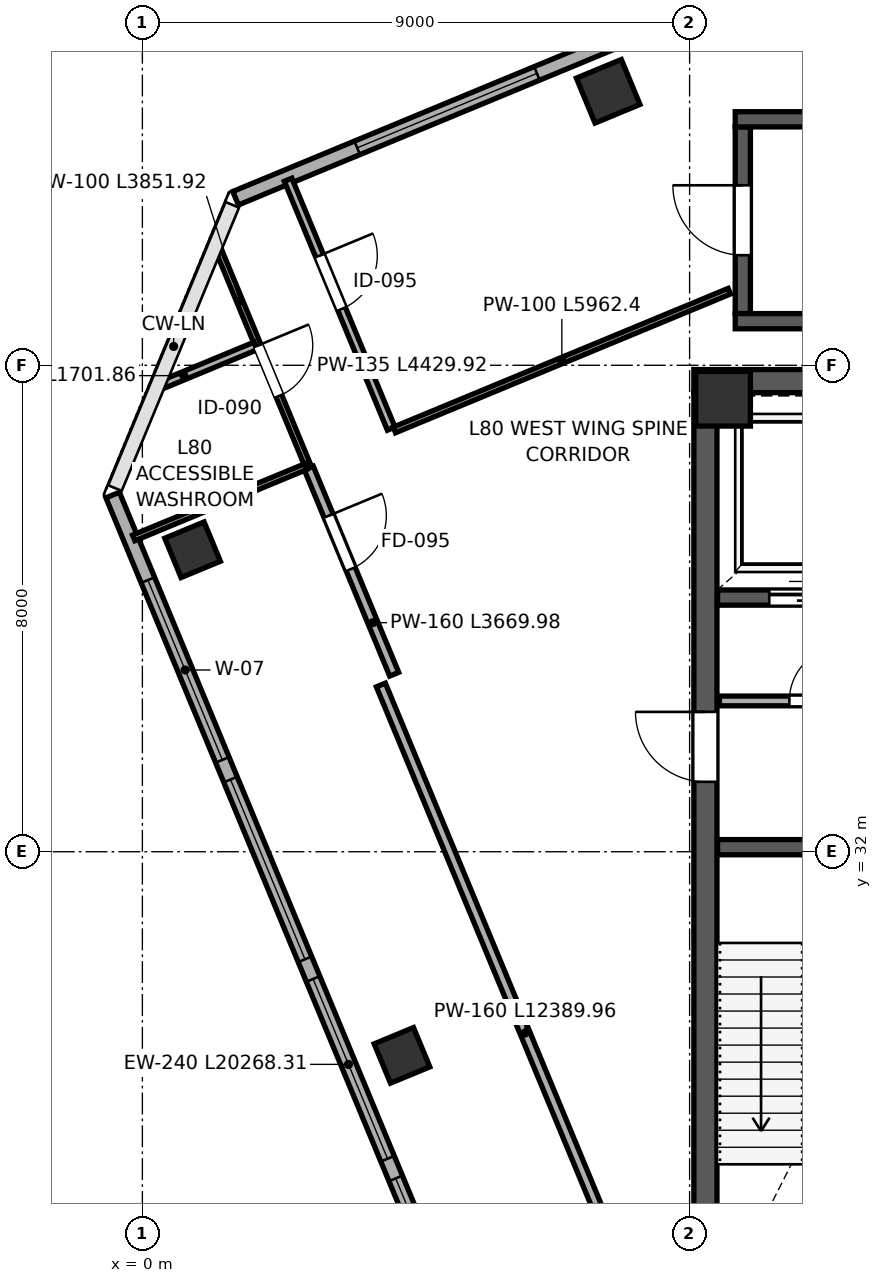
"""IFC4 building model, lengths in metres.
Left out: names, types, materials, properties, quantities, classifications, styles, units other than length and angle.
Written with IfcOpenShell. Run it as: python <this file> out.ifc"""

import sys

from ifc_helpers import new_model, si_unit, direction, frame, frame_2d, origin, origin_2d, place, context, subcontext, project, spatial, rectangle, extrude, source, transform, mapped, element, fill, save


model = new_model("IFC4")
c1 = context("Model", 3, precision=1e-05, world=origin(), true_north=direction((0.0, 1.0)))
c2 = subcontext(c1, "Body", "Model", "MODEL_VIEW")
j1 = project(units=[si_unit("LENGTHUNIT", "METRE"), si_unit("PLANEANGLEUNIT", "RADIAN")], contexts=[c1])
p1 = place(None, origin())
s1 = spatial("IfcSite", under=j1, at=p1, CompositionType="ELEMENT")
p2 = place(p1, origin())
s2 = spatial("IfcBuilding", under=s1, at=p2, CompositionType="ELEMENT")
p3 = place(p2, frame((0.0, 0.0, 355.2)))
s3 = spatial("IfcBuildingStorey", under=s2, at=p3, CompositionType="ELEMENT", Elevation=355.2)
m1 = source(origin(), c2, "Body", "SweptSolid", [
    extrude(rectangle(XDim=0.9, YDim=0.9, at=origin_2d()), origin(), (0.0, 0.0, 1.0), 4.799),
])
p4 = place(p3, frame((9.55, 39.45, 0.001), z_axis=(0.0, 0.0, 1.0), x_axis=(1.0, 0.0, 0.0)))
e1 = element("IfcColumn", 1, at=p4, inside=s3, PredefinedType="COLUMN", context=c2, shape_type="MappedRepresentation", body=[
    mapped(m1, transform((0.0, 0.0, 0.0), scale=1.0)),
])
m2 = source(origin(), c2, "Body", "SweptSolid", [
    extrude(rectangle(XDim=0.7, YDim=0.7, at=origin_2d()), origin(), (0.0, 0.0, 1.0), 4.799),
])
for number, where, z_axis, x_axis in (
    (2, (0.826, 36.966, 0.001), (0.0, 0.0, 1.0), (-0.383, 0.924, 0.0)),
    (3, (4.27, 28.651, 0.001), (0.0, 0.0, 1.0), (-0.383, 0.924, 0.0)),
):
    element("IfcColumn", number, at=place(p3, frame(where, z_axis=z_axis, x_axis=x_axis)), inside=s3, PredefinedType="COLUMN", context=c2, shape_type="MappedRepresentation", body=[
        mapped(m2, transform((0.0, 0.0, 0.0), scale=1.0)),
    ])
m3 = source(origin(), c2, "Body", "SweptSolid", [
    extrude(rectangle(XDim=0.8, YDim=0.8, at=origin_2d()), origin(), (0.0, 0.0, 1.0), 4.799),
])
p5 = place(p3, frame((7.661, 44.506, 0.001), z_axis=(0.0, 0.0, 1.0), x_axis=(-0.382683432365, 0.923879532511, 0.0)))
e4 = element("IfcColumn", 4, at=p5, inside=s3, PredefinedType="COLUMN", context=c2, shape_type="MappedRepresentation", body=[
    mapped(m3, transform((0.0, 0.0, 0.0), scale=1.0)),
])
p6 = place(p3, frame((-0.489, 37.866, 0.0), z_axis=(0.0, 0.0, 1.0), x_axis=(0.382671297852, -0.923884558698, 0.0)))
e5 = element("IfcWall", 5, at=p6, inside=s3, PredefinedType="SOLIDWALL", context=c2, shape_type="SweptSolid", body=[
    extrude(rectangle(XDim=20.268, YDim=0.24, at=frame_2d((10.134, 0.0))), origin(), (0.0, 0.0, 1.0), 4.52),
])
p7 = place(p6, frame((1.514, 0.0, 0.45)))
e6 = element("IfcOpeningElement", 6, at=p7, cuts=e5, PredefinedType="OPENING", context=c2, shape_type="SweptSolid", body=[
    extrude(rectangle(XDim=3.2, YDim=2.5, at=frame_2d((1.6, 1.25))), frame((0.0, 0.13, 0.0), z_axis=(0.0, -1.0, 0.0), x_axis=(1.0, 0.0, 0.0)), (0.0, 0.0, 1.0), 0.26),
])
p8 = place(p6, frame((5.064, 0.0, 0.45)))
e7 = element("IfcOpeningElement", 7, at=p8, cuts=e5, PredefinedType="OPENING", context=c2, shape_type="SweptSolid", body=[
    extrude(rectangle(XDim=3.2, YDim=2.5, at=frame_2d((1.6, 1.25))), frame((0.0, 0.13, 0.0), z_axis=(0.0, -1.0, 0.0), x_axis=(1.0, 0.0, 0.0)), (0.0, 0.0, 1.0), 0.26),
])
p9 = place(p6, frame((8.614, 0.0, 0.45)))
e8 = element("IfcOpeningElement", 8, at=p9, cuts=e5, PredefinedType="OPENING", context=c2, shape_type="SweptSolid", body=[
    extrude(rectangle(XDim=3.2, YDim=2.5, at=frame_2d((1.6, 1.25))), frame((0.0, 0.13, 0.0), z_axis=(0.0, -1.0, 0.0), x_axis=(1.0, 0.0, 0.0)), (0.0, 0.0, 1.0), 0.26),
])
p10 = place(p6, frame((12.164, 0.0, 0.45)))
e9 = element("IfcOpeningElement", 9, at=p10, cuts=e5, PredefinedType="OPENING", context=c2, shape_type="SweptSolid", body=[
    extrude(rectangle(XDim=3.2, YDim=2.5, at=frame_2d((1.6, 1.25))), frame((0.0, 0.13, 0.0), z_axis=(0.0, -1.0, 0.0), x_axis=(1.0, 0.0, 0.0)), (0.0, 0.0, 1.0), 0.26),
])
p11 = place(p6, frame((15.714, 0.0, 0.45)))
e10 = element("IfcOpeningElement", 10, at=p11, cuts=e5, PredefinedType="OPENING", context=c2, shape_type="SweptSolid", body=[
    extrude(rectangle(XDim=3.2, YDim=2.5, at=frame_2d((1.6, 1.25))), frame((0.0, 0.13, 0.0), z_axis=(0.0, -1.0, 0.0), x_axis=(1.0, 0.0, 0.0)), (0.0, 0.0, 1.0), 0.26),
])
p12 = place(p3, frame((26.171, 52.953, 0.0), z_axis=(0.0, 0.0, 1.0), x_axis=(-0.923878251708, -0.382686524484, 0.0)))
e11 = element("IfcWall", 11, at=p12, inside=s3, PredefinedType="SOLIDWALL", context=c2, shape_type="SweptSolid", body=[
    extrude(rectangle(XDim=26.668, YDim=0.24, at=frame_2d((13.334, 0.0))), origin(), (0.0, 0.0, 1.0), 4.52),
])
p13 = place(p12, frame((13.454, 0.0, 0.45)))
e12 = element("IfcOpeningElement", 12, at=p13, cuts=e11, PredefinedType="OPENING", context=c2, shape_type="SweptSolid", body=[
    extrude(rectangle(XDim=3.2, YDim=2.5, at=frame_2d((1.6, 1.25))), frame((0.0, 0.13, 0.0), z_axis=(0.0, -1.0, 0.0), x_axis=(1.0, 0.0, 0.0)), (0.0, 0.0, 1.0), 0.26),
])
p14 = place(p12, frame((21.304, 0.0, 0.45)))
e13 = element("IfcOpeningElement", 13, at=p14, cuts=e11, PredefinedType="OPENING", context=c2, shape_type="SweptSolid", body=[
    extrude(rectangle(XDim=3.2, YDim=2.5, at=frame_2d((1.6, 1.25))), frame((0.0, 0.13, 0.0), z_axis=(0.0, -1.0, 0.0), x_axis=(1.0, 0.0, 0.0)), (0.0, 0.0, 1.0), 0.26),
])
p15 = place(p3, frame((9.26, 24.45, 0.0), z_axis=(0.0, 0.0, 1.0), x_axis=(0.0, 1.0, 0.0)))
e14 = element("IfcWall", 14, at=p15, inside=s3, PredefinedType="SHEAR", context=c2, shape_type="SweptSolid", body=[
    extrude(rectangle(XDim=15.1, YDim=0.38, at=frame_2d((7.55, 0.0))), origin(), (0.0, 0.0, 1.0), 4.52),
])
p16 = place(p15, frame((8.7, 0.0, 0.0)))
e15 = element("IfcOpeningElement", 15, at=p16, cuts=e14, PredefinedType="OPENING", context=c2, shape_type="SweptSolid", body=[
    extrude(rectangle(XDim=1.15, YDim=2.2, at=frame_2d((0.575, 1.1))), frame((0.0, 0.2, 0.0), z_axis=(0.0, -1.0, 0.0), x_axis=(1.0, 0.0, 0.0)), (0.0, 0.0, 1.0), 0.4),
])
p17 = place(p3, frame((9.07, 39.74, 0.0), z_axis=(0.0, 0.0, 1.0), x_axis=(1.0, 0.0, 0.0)))
e16 = element("IfcWall", 16, at=p17, inside=s3, PredefinedType="SHEAR", context=c2, shape_type="SweptSolid", body=[
    extrude(rectangle(XDim=17.86, YDim=0.38, at=frame_2d((8.93, 0.0))), origin(), (0.0, 0.0, 1.0), 4.52),
])
p18 = place(p3, frame((9.46, 32.075, 0.0), z_axis=(0.0, 0.0, 1.0), x_axis=(1.0, 0.0, 0.0)))
e17 = element("IfcWall", 17, at=p18, inside=s3, PredefinedType="SHEAR", context=c2, shape_type="SweptSolid", body=[
    extrude(rectangle(XDim=3.29, YDim=0.25, at=frame_2d((1.645, 0.0))), origin(), (0.0, 0.0, 1.0), 4.52),
])
p19 = place(p3, frame((9.46, 36.18, 0.0), z_axis=(0.0, 0.0, 1.0), x_axis=(1.0, 0.0, 0.0)))
e18 = element("IfcWall", 18, at=p19, inside=s3, PredefinedType="SHEAR", context=c2, shape_type="SweptSolid", body=[
    extrude(rectangle(XDim=3.79, YDim=0.25, at=frame_2d((1.895, 0.0))), origin(), (0.0, 0.0, 1.0), 4.52),
])
p20 = place(p19, frame((2.62, 0.0, 0.0)))
e19 = element("IfcOpeningElement", 19, at=p20, cuts=e18, PredefinedType="OPENING", context=c2, shape_type="SweptSolid", body=[
    extrude(rectangle(XDim=0.85, YDim=2.1, at=frame_2d((0.425, 1.05))), frame((0.0, 0.135, 0.0), z_axis=(0.0, -1.0, 0.0), x_axis=(1.0, 0.0, 0.0)), (0.0, 0.0, 1.0), 0.27),
])
p21 = place(p19, frame((0.85, 0.0, 0.0)))
e20 = element("IfcOpeningElement", 20, at=p21, cuts=e18, PredefinedType="OPENING", context=c2, shape_type="SweptSolid", body=[
    extrude(rectangle(XDim=1.3, YDim=2.25, at=frame_2d((0.65, 1.125))), frame((0.0, 0.135, 0.0), z_axis=(0.0, -1.0, 0.0), x_axis=(1.0, 0.0, 0.0)), (0.0, 0.0, 1.0), 0.27),
])
p22 = place(p3, frame((9.875, 40.85, 0.0), z_axis=(0.0, 0.0, 1.0), x_axis=(0.0, 1.0, 0.0)))
e21 = element("IfcWall", 21, at=p22, inside=s3, PredefinedType="SHEAR", context=c2, shape_type="SweptSolid", body=[
    extrude(rectangle(XDim=3.07, YDim=0.25, at=frame_2d((1.535, 0.0))), origin(), (0.0, 0.0, 1.0), 4.52),
])
p23 = place(p22, frame((0.96, 0.0, 0.0)))
e22 = element("IfcOpeningElement", 22, at=p23, cuts=e21, PredefinedType="OPENING", context=c2, shape_type="SweptSolid", body=[
    extrude(rectangle(XDim=1.15, YDim=2.2, at=frame_2d((0.575, 1.1))), frame((0.0, 0.135, 0.0), z_axis=(0.0, -1.0, 0.0), x_axis=(1.0, 0.0, 0.0)), (0.0, 0.0, 1.0), 0.27),
])
for number, where, z_axis, x_axis in (
    (23, (9.75, 40.725, 0.0), (0.0, 0.0, 1.0), (1.0, 0.0, 0.0)),
    (24, (9.75, 44.045, 0.0), (0.0, 0.0, 1.0), (1.0, 0.0, 0.0)),
):
    element("IfcWall", number, at=place(p3, frame(where, z_axis=z_axis, x_axis=x_axis)), inside=s3, PredefinedType="SHEAR", context=c2, shape_type="SweptSolid", body=[
        extrude(rectangle(XDim=8.05, YDim=0.25, at=frame_2d((4.025, 0.0))), origin(), (0.0, 0.0, 1.0), 4.52),
    ])
p24 = place(p3, frame((9.49, 34.48, 0.0), z_axis=(0.0, 0.0, 1.0), x_axis=(1.0, 0.0, 0.0)))
e25 = element("IfcWall", 25, at=p24, inside=s3, PredefinedType="PARTITIONING", context=c2, shape_type="SweptSolid", body=[
    extrude(rectangle(XDim=3.7, YDim=0.16, at=frame_2d((1.85, 0.0))), origin(), (0.0, 0.0, 1.0), 4.52),
])
p25 = place(p24, frame((1.15, 0.0, 0.0)))
e26 = element("IfcOpeningElement", 26, at=p25, cuts=e25, PredefinedType="OPENING", context=c2, shape_type="SweptSolid", body=[
    extrude(rectangle(XDim=0.9, YDim=2.15, at=frame_2d((0.45, 1.075))), frame((0.0, 0.09, 0.0), z_axis=(0.0, -1.0, 0.0), x_axis=(1.0, 0.0, 0.0)), (0.0, 0.0, 1.0), 0.18),
])
p26 = place(p3, frame((1.232, 41.943, 0.0), z_axis=(0.0, 0.0, 1.0), x_axis=(0.382652221475, -0.923892459868, 0.0)))
e27 = element("IfcWall", 27, at=p26, inside=s3, PredefinedType="PARTITIONING", context=c2, shape_type="SweptSolid", body=[
    extrude(rectangle(XDim=3.852, YDim=0.1, at=frame_2d((1.926, 0.0))), origin(), (0.0, 0.0, 1.0), 4.52),
])
p27 = place(p26, frame((1.75, 0.0, 0.0)))
e28 = element("IfcOpeningElement", 28, at=p27, cuts=e27, PredefinedType="OPENING", context=c2, shape_type="SweptSolid", body=[
    extrude(rectangle(XDim=0.9, YDim=2.15, at=frame_2d((0.45, 1.075))), frame((0.0, 0.06, 0.0), z_axis=(0.0, -1.0, 0.0), x_axis=(1.0, 0.0, 0.0)), (0.0, 0.0, 1.0), 0.12),
])
p28 = place(p3, frame((0.29, 39.667, 0.0), z_axis=(0.0, 0.0, 1.0), x_axis=(0.923855963606, 0.38274032778, 0.0)))
e29 = element("IfcWall", 29, at=p28, inside=s3, PredefinedType="PARTITIONING", context=c2, shape_type="SweptSolid", body=[
    extrude(rectangle(XDim=1.702, YDim=0.135, at=frame_2d((0.851, 0.0))), origin(), (0.0, 0.0, 1.0), 4.52),
])
p29 = place(p3, frame((2.737, 38.31, 0.0), z_axis=(0.0, 0.0, 1.0), x_axis=(0.382706260748, -0.923870076355, 0.0)))
e30 = element("IfcWall", 30, at=p29, inside=s3, PredefinedType="PARTITIONING", context=c2, shape_type="SweptSolid", body=[
    extrude(rectangle(XDim=3.67, YDim=0.16, at=frame_2d((1.835, 0.0))), origin(), (0.0, 0.0, 1.0), 4.52),
])
p30 = place(p29, frame((0.85, 0.0, 0.0)))
e31 = element("IfcOpeningElement", 31, at=p30, cuts=e30, PredefinedType="OPENING", context=c2, shape_type="SweptSolid", body=[
    extrude(rectangle(XDim=0.95, YDim=2.15, at=frame_2d((0.475, 1.075))), frame((0.0, 0.09, 0.0), z_axis=(0.0, -1.0, 0.0), x_axis=(1.0, 0.0, 0.0)), (0.0, 0.0, 1.0), 0.18),
])
p31 = place(p3, frame((3.923, 34.742, 0.0), z_axis=(0.0, 0.0, 1.0), x_axis=(0.382686508818, -0.923878258197, 0.0)))
e32 = element("IfcWall", 32, at=p31, inside=s3, PredefinedType="PARTITIONING", context=c2, shape_type="SweptSolid", body=[
    extrude(rectangle(XDim=12.39, YDim=0.16, at=frame_2d((6.195, 0.0))), origin(), (0.0, 0.0, 1.0), 4.52),
])
p32 = place(p3, frame((-0.142, 37.161, 0.0), z_axis=(0.0, 0.0, 1.0), x_axis=(0.923868053335, 0.382711144374, 0.0)))
e33 = element("IfcWall", 33, at=p32, inside=s3, PredefinedType="PARTITIONING", context=c2, shape_type="SweptSolid", body=[
    extrude(rectangle(XDim=3.06, YDim=0.1, at=frame_2d((1.53, 0.0))), origin(), (0.0, 0.0, 1.0), 4.52),
])
p33 = place(p3, frame((2.397, 43.051, 0.0), z_axis=(0.0, 0.0, 1.0), x_axis=(0.382689257808, -0.923877119512, 0.0)))
e34 = element("IfcWall", 34, at=p33, inside=s3, PredefinedType="PARTITIONING", context=c2, shape_type="SweptSolid", body=[
    extrude(rectangle(XDim=4.43, YDim=0.135, at=frame_2d((2.215, 0.0))), origin(), (0.0, 0.0, 1.0), 4.52),
])
p34 = place(p33, frame((1.35, 0.0, 0.0)))
e35 = element("IfcOpeningElement", 35, at=p34, cuts=e34, PredefinedType="OPENING", context=c2, shape_type="SweptSolid", body=[
    extrude(rectangle(XDim=0.95, YDim=2.15, at=frame_2d((0.475, 1.075))), frame((0.0, 0.078, 0.0), z_axis=(0.0, -1.0, 0.0), x_axis=(1.0, 0.0, 0.0)), (0.0, 0.0, 1.0), 0.155),
])
p35 = place(p3, frame((4.145, 38.936, 0.0), z_axis=(0.0, 0.0, 1.0), x_axis=(0.923878093623, 0.38268690613, 0.0)))
e36 = element("IfcWall", 36, at=p35, inside=s3, PredefinedType="PARTITIONING", context=c2, shape_type="SweptSolid", body=[
    extrude(rectangle(XDim=5.962, YDim=0.1, at=frame_2d((2.981, 0.0))), origin(), (0.0, 0.0, 1.0), 4.52),
])
m4 = source(origin(), c2, "Body", "SweptSolid", [
    extrude(rectangle(XDim=3.2, YDim=2.5, at=frame_2d((1.6, 1.25))), frame((0.0, 0.03, 0.0), z_axis=(0.0, -1.0, 0.0), x_axis=(1.0, 0.0, 0.0)), (0.0, 0.0, 1.0), 0.06),
])
p36 = place(p7, origin())
e37 = element("IfcWindow", 37, at=p36, inside=s3, PartitioningType="TRIPLE_PANEL_VERTICAL", PredefinedType="WINDOW", context=c2, shape_type="MappedRepresentation", body=[
    mapped(m4, transform((0.0, 0.0, 0.0), scale=1.0)),
])
fill(e6, e37)
p37 = place(p8, origin())
e38 = element("IfcWindow", 38, at=p37, inside=s3, PartitioningType="TRIPLE_PANEL_VERTICAL", PredefinedType="WINDOW", context=c2, shape_type="MappedRepresentation", body=[
    mapped(m4, transform((0.0, 0.0, 0.0), scale=1.0)),
])
fill(e7, e38)
p38 = place(p9, origin())
e39 = element("IfcWindow", 39, at=p38, inside=s3, PartitioningType="TRIPLE_PANEL_VERTICAL", PredefinedType="WINDOW", context=c2, shape_type="MappedRepresentation", body=[
    mapped(m4, transform((0.0, 0.0, 0.0), scale=1.0)),
])
fill(e8, e39)
p39 = place(p10, origin())
e40 = element("IfcWindow", 40, at=p39, inside=s3, PartitioningType="TRIPLE_PANEL_VERTICAL", PredefinedType="WINDOW", context=c2, shape_type="MappedRepresentation", body=[
    mapped(m4, transform((0.0, 0.0, 0.0), scale=1.0)),
])
fill(e9, e40)
p40 = place(p14, origin())
e41 = element("IfcWindow", 41, at=p40, inside=s3, PartitioningType="TRIPLE_PANEL_VERTICAL", PredefinedType="WINDOW", context=c2, shape_type="MappedRepresentation", body=[
    mapped(m4, transform((0.0, 0.0, 0.0), scale=1.0)),
])
fill(e13, e41)
m5 = source(origin(), c2, "Body", "SweptSolid", [
    extrude(rectangle(XDim=1.15, YDim=2.2, at=frame_2d((0.575, 1.1))), frame((0.0, 0.025, 0.0), z_axis=(0.0, -1.0, 0.0), x_axis=(1.0, 0.0, 0.0)), (0.0, 0.0, 1.0), 0.05),
])
p41 = place(p16, origin())
e42 = element("IfcDoor", 42, at=p41, inside=s3, OperationType="SINGLE_SWING_RIGHT", PredefinedType="DOOR", context=c2, shape_type="MappedRepresentation", body=[
    mapped(m5, transform((0.0, 0.0, 0.0), scale=1.0)),
])
fill(e15, e42)
p42 = place(p23, origin())
e43 = element("IfcDoor", 43, at=p42, inside=s3, OperationType="SINGLE_SWING_RIGHT", PredefinedType="DOOR", context=c2, shape_type="MappedRepresentation", body=[
    mapped(m5, transform((0.0, 0.0, 0.0), scale=1.0)),
])
fill(e22, e43)
m6 = source(origin(), c2, "Body", "SweptSolid", [
    extrude(rectangle(XDim=1.3, YDim=2.25, at=frame_2d((0.65, 1.125))), frame((0.0, 0.025, 0.0), z_axis=(0.0, -1.0, 0.0), x_axis=(1.0, 0.0, 0.0)), (0.0, 0.0, 1.0), 0.05),
])
p43 = place(p21, origin())
e44 = element("IfcDoor", 44, at=p43, inside=s3, OperationType="SLIDING_TO_LEFT", PredefinedType="DOOR", context=c2, shape_type="MappedRepresentation", body=[
    mapped(m6, transform((0.0, 0.0, 0.0), scale=1.0)),
])
fill(e20, e44)
m7 = source(origin(), c2, "Body", "SweptSolid", [
    extrude(rectangle(XDim=0.9, YDim=2.15, at=frame_2d((0.45, 1.075))), frame((0.0, 0.025, 0.0), z_axis=(0.0, -1.0, 0.0), x_axis=(1.0, 0.0, 0.0)), (0.0, 0.0, 1.0), 0.05),
])
p44 = place(p25, origin())
e45 = element("IfcDoor", 45, at=p44, inside=s3, OperationType="SINGLE_SWING_RIGHT", PredefinedType="DOOR", context=c2, shape_type="MappedRepresentation", body=[
    mapped(m7, transform((0.0, 0.0, 0.0), scale=1.0)),
])
fill(e26, e45)
m8 = source(origin(), c2, "Body", "SweptSolid", [
    extrude(rectangle(XDim=0.9, YDim=2.15, at=frame_2d((0.45, 1.075))), frame((0.0, 0.025, 0.0), z_axis=(0.0, -1.0, 0.0), x_axis=(1.0, 0.0, 0.0)), (0.0, 0.0, 1.0), 0.05),
])
p45 = place(p27, origin())
e46 = element("IfcDoor", 46, at=p45, inside=s3, OperationType="SINGLE_SWING_LEFT", PredefinedType="DOOR", context=c2, shape_type="MappedRepresentation", body=[
    mapped(m8, transform((0.0, 0.0, 0.0), scale=1.0)),
])
fill(e28, e46)
m9 = source(origin(), c2, "Body", "SweptSolid", [
    extrude(rectangle(XDim=0.95, YDim=2.15, at=frame_2d((0.475, 1.075))), frame((0.0, 0.025, 0.0), z_axis=(0.0, -1.0, 0.0), x_axis=(1.0, 0.0, 0.0)), (0.0, 0.0, 1.0), 0.05),
])
p46 = place(p30, origin())
e47 = element("IfcDoor", 47, at=p46, inside=s3, OperationType="SINGLE_SWING_LEFT", PredefinedType="DOOR", context=c2, shape_type="MappedRepresentation", body=[
    mapped(m9, transform((0.0, 0.0, 0.0), scale=1.0)),
])
fill(e31, e47)
m10 = source(origin(), c2, "Body", "SweptSolid", [
    extrude(rectangle(XDim=0.95, YDim=2.15, at=frame_2d((0.475, 1.075))), frame((0.0, 0.025, 0.0), z_axis=(0.0, -1.0, 0.0), x_axis=(1.0, 0.0, 0.0)), (0.0, 0.0, 1.0), 0.05),
])
p47 = place(p34, origin())
e48 = element("IfcDoor", 48, at=p47, inside=s3, OperationType="SINGLE_SWING_LEFT", PredefinedType="DOOR", context=c2, shape_type="MappedRepresentation", body=[
    mapped(m10, transform((0.0, 0.0, 0.0), scale=1.0)),
])
fill(e35, e48)
save(model, sys.argv[1])
